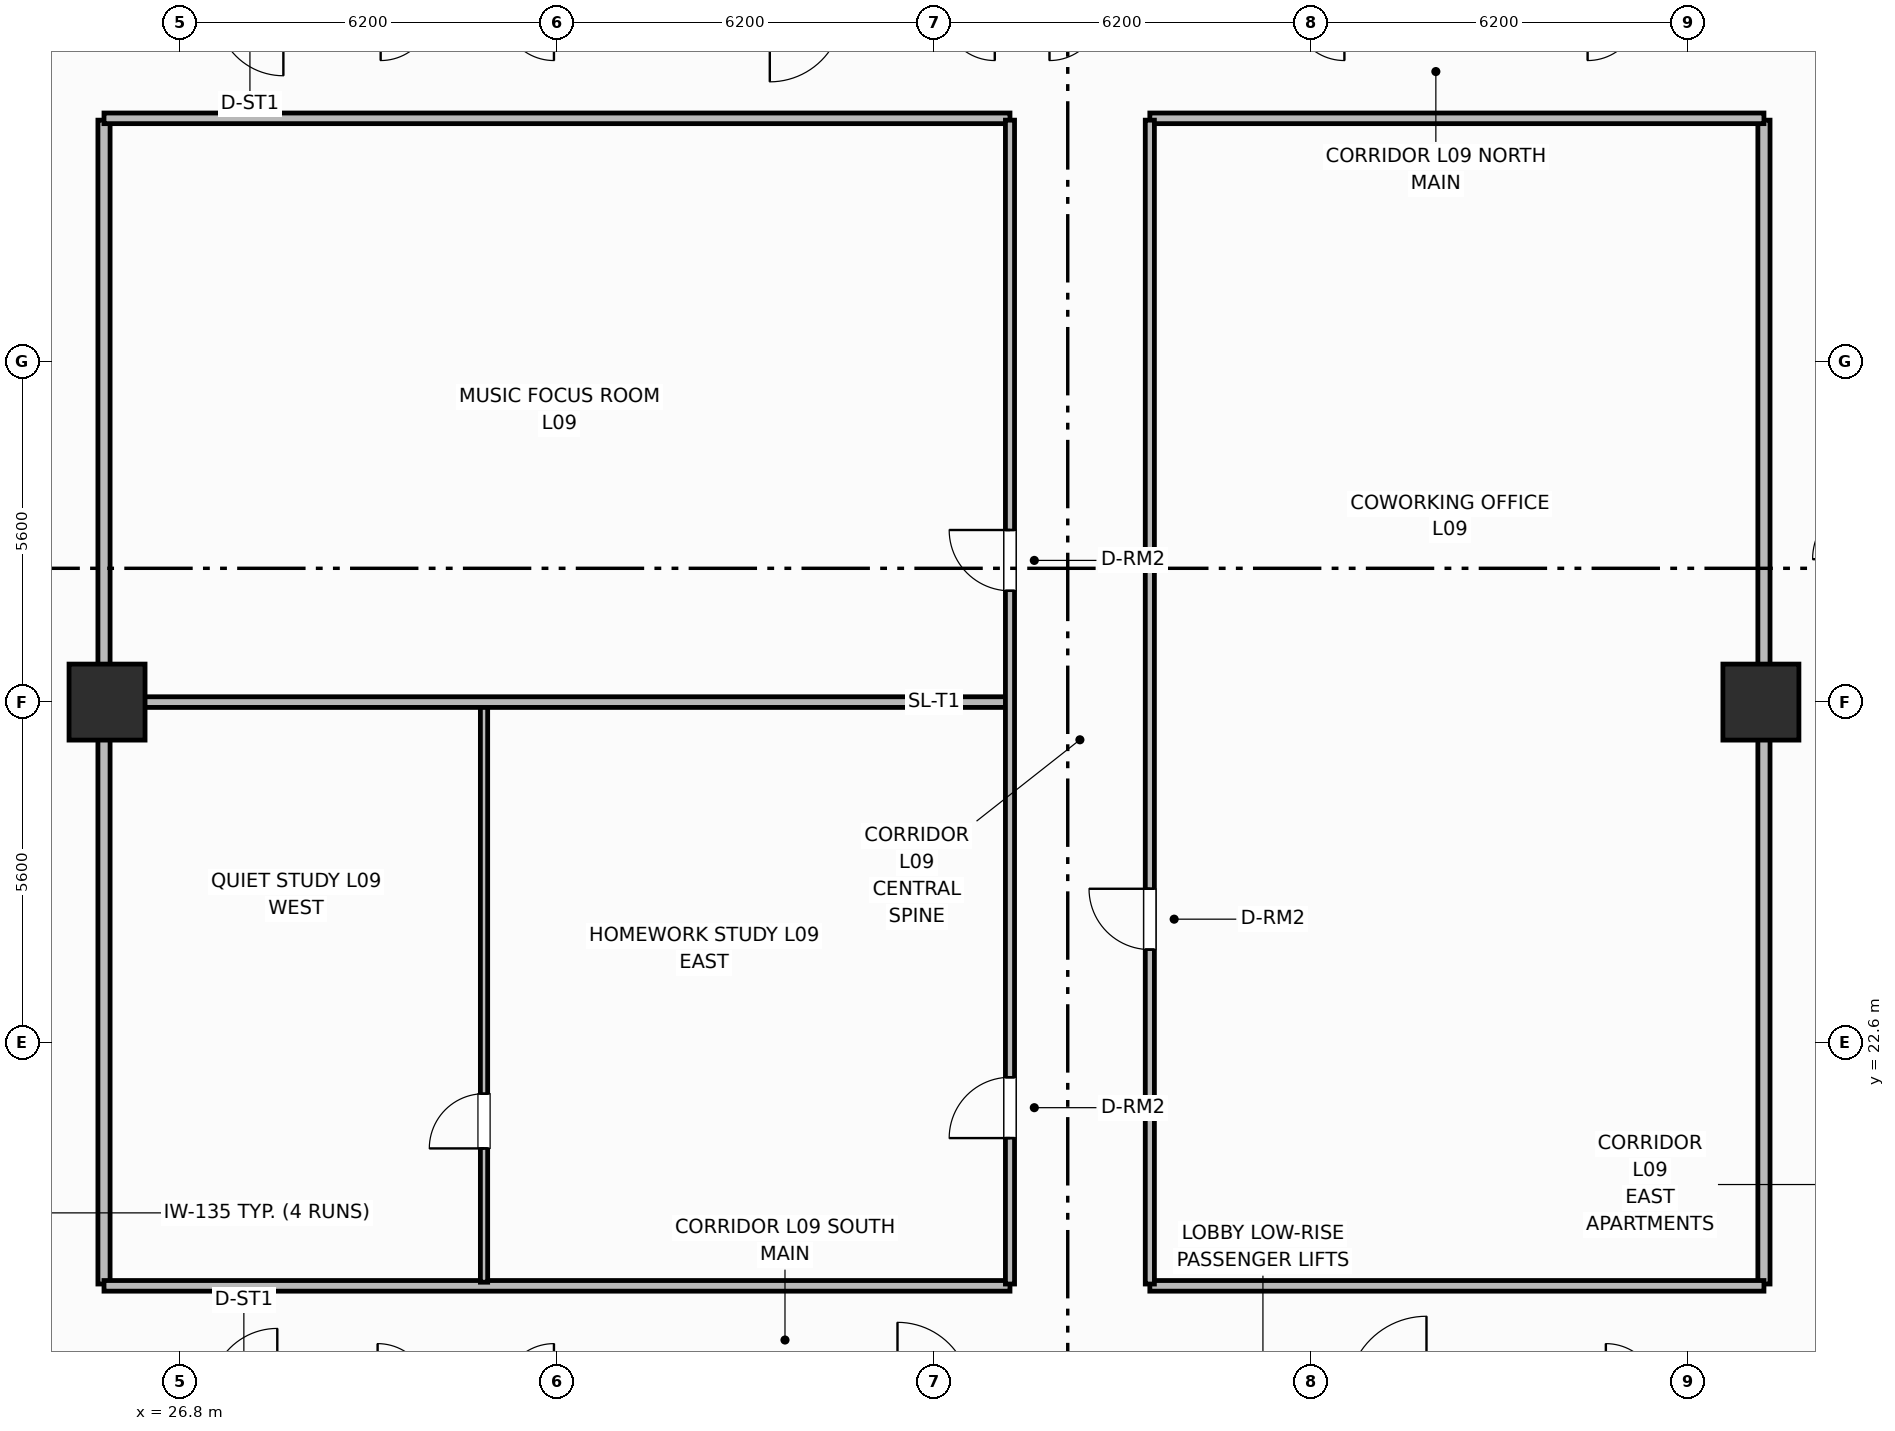
"""IFC4 building model, lengths in metres.
Left out: names, types, materials, properties, quantities, classifications, styles, units other than length and angle.
Written with IfcOpenShell. Run it as: python <this file> out.ifc"""

import sys

from ifc_helpers import new_model, si_unit, direction, frame, frame_2d, origin, origin_2d, place, context, subcontext, project, spatial, rectangle, extrude, element, fill, save


model = new_model("IFC4")
c1 = context("Model", 3, precision=1e-05, world=origin(), true_north=direction((0.0, 1.0)))
c2 = subcontext(c1, "Body", "Model", "MODEL_VIEW")
j1 = project(units=[si_unit("LENGTHUNIT", "METRE"), si_unit("PLANEANGLEUNIT", "RADIAN")], contexts=[c1])
p1 = place(None, origin())
s1 = spatial("IfcSite", under=j1, at=p1, CompositionType="ELEMENT")
p2 = place(p1, origin())
s2 = spatial("IfcBuilding", under=s1, at=p2, CompositionType="ELEMENT")
p3 = place(p2, frame((0.0, 0.0, 39.9)))
s3 = spatial("IfcBuildingStorey", under=s2, at=p3, CompositionType="ELEMENT", Elevation=39.9)
for number, where, z_axis, x_axis in (
    (1, (25.6, 28.2, 0.0), (0.0, 0.0, 1.0), (1.0, 0.0, 0.0)),
    (2, (52.8, 28.2, 0.0), (0.0, 0.0, 1.0), (1.0, 0.0, 0.0)),
):
    element("IfcColumn", number, at=place(p3, frame(where, z_axis=z_axis, x_axis=x_axis)), inside=s3, PredefinedType="COLUMN", context=c2, shape_type="SweptSolid", body=[
        extrude(rectangle(XDim=1.25, YDim=1.25, at=origin_2d()), origin(), (0.0, 0.0, 1.0), 3.7),
    ])
for number, where, z_axis, x_axis in (
    (3, (25.55, 18.63, 0.0), (0.0, 0.0, 1.0), (0.0, 1.0, 0.0)),
    (4, (52.85, 18.63, 0.0), (0.0, 0.0, 1.0), (0.0, 1.0, 0.0)),
):
    element("IfcWall", number, at=place(p3, frame(where, z_axis=z_axis, x_axis=x_axis)), inside=s3, PredefinedType="PARTITIONING", context=c2, shape_type="SweptSolid", body=[
        extrude(rectangle(XDim=19.14, YDim=0.2, at=frame_2d((9.57, 0.0))), origin(), (0.0, 0.0, 1.0), 2.53),
    ])
p4 = place(p3, frame((25.55, 18.6, 0.0), z_axis=(0.0, 0.0, 1.0), x_axis=(1.0, 0.0, 0.0)))
e5 = element("IfcWall", 5, at=p4, inside=s3, PredefinedType="PARTITIONING", context=c2, shape_type="SweptSolid", body=[
    extrude(rectangle(XDim=14.9, YDim=0.175, at=frame_2d((7.45, 0.0))), origin(), (0.0, 0.0, 1.0), 2.53),
])
p5 = place(p3, frame((42.75, 18.6, 0.0), z_axis=(0.0, 0.0, 1.0), x_axis=(1.0, 0.0, 0.0)))
e6 = element("IfcWall", 6, at=p5, inside=s3, PredefinedType="PARTITIONING", context=c2, shape_type="SweptSolid", body=[
    extrude(rectangle(XDim=10.1, YDim=0.175, at=frame_2d((5.05, 0.0))), origin(), (0.0, 0.0, 1.0), 2.53),
])
p6 = place(p3, frame((25.55, 37.8, 0.0), z_axis=(0.0, 0.0, 1.0), x_axis=(1.0, 0.0, 0.0)))
e7 = element("IfcWall", 7, at=p6, inside=s3, PredefinedType="PARTITIONING", context=c2, shape_type="SweptSolid", body=[
    extrude(rectangle(XDim=14.9, YDim=0.175, at=frame_2d((7.45, 0.0))), origin(), (0.0, 0.0, 1.0), 2.53),
])
p7 = place(p3, frame((42.75, 37.8, 0.0), z_axis=(0.0, 0.0, 1.0), x_axis=(1.0, 0.0, 0.0)))
e8 = element("IfcWall", 8, at=p7, inside=s3, PredefinedType="PARTITIONING", context=c2, shape_type="SweptSolid", body=[
    extrude(rectangle(XDim=10.1, YDim=0.175, at=frame_2d((5.05, 0.0))), origin(), (0.0, 0.0, 1.0), 2.53),
])
p8 = place(p3, frame((31.8, 18.66, 0.0), z_axis=(0.0, 0.0, 1.0), x_axis=(0.0, 1.0, 0.0)))
e9 = element("IfcWall", 9, at=p8, inside=s3, PredefinedType="PARTITIONING", context=c2, shape_type="SweptSolid", body=[
    extrude(rectangle(XDim=9.49, YDim=0.12, at=frame_2d((4.745, 0.0))), origin(), (0.0, 0.0, 1.0), 2.53),
])
p9 = place(p8, frame((2.2, 0.0, 0.0)))
e10 = element("IfcOpeningElement", 10, at=p9, cuts=e9, PredefinedType="OPENING", context=c2, shape_type="SweptSolid", body=[
    extrude(rectangle(XDim=0.9, YDim=2.1, at=frame_2d((0.45, 1.05))), frame((0.0, 0.07, 0.0), z_axis=(0.0, -1.0, 0.0), x_axis=(1.0, 0.0, 0.0)), (0.0, 0.0, 1.0), 0.14),
])
p10 = place(p3, frame((25.6, 28.2, 0.0), z_axis=(0.0, 0.0, 1.0), x_axis=(1.0, 0.0, 0.0)))
e11 = element("IfcWall", 11, at=p10, inside=s3, PredefinedType="PARTITIONING", context=c2, shape_type="SweptSolid", body=[
    extrude(rectangle(XDim=14.87, YDim=0.175, at=frame_2d((7.435, 0.0))), origin(), (0.0, 0.0, 1.0), 2.53),
])
p11 = place(p3, frame((40.45, 18.63, 0.0), z_axis=(0.0, 0.0, 1.0), x_axis=(0.0, 1.0, 0.0)))
e12 = element("IfcWall", 12, at=p11, inside=s3, PredefinedType="PARTITIONING", context=c2, shape_type="SweptSolid", body=[
    extrude(rectangle(XDim=19.14, YDim=0.15, at=frame_2d((9.57, 0.0))), origin(), (0.0, 0.0, 1.0), 2.53),
])
p12 = place(p11, frame((2.4, 0.0, 0.0)))
e13 = element("IfcOpeningElement", 13, at=p12, cuts=e12, PredefinedType="OPENING", context=c2, shape_type="SweptSolid", body=[
    extrude(rectangle(XDim=1.0, YDim=2.15, at=frame_2d((0.5, 1.075))), frame((0.0, 0.085, 0.0), z_axis=(0.0, -1.0, 0.0), x_axis=(1.0, 0.0, 0.0)), (0.0, 0.0, 1.0), 0.17),
])
p13 = place(p11, frame((11.4, 0.0, 0.0)))
e14 = element("IfcOpeningElement", 14, at=p13, cuts=e12, PredefinedType="OPENING", context=c2, shape_type="SweptSolid", body=[
    extrude(rectangle(XDim=1.0, YDim=2.15, at=frame_2d((0.5, 1.075))), frame((0.0, 0.085, 0.0), z_axis=(0.0, -1.0, 0.0), x_axis=(1.0, 0.0, 0.0)), (0.0, 0.0, 1.0), 0.17),
])
p14 = place(p3, frame((42.75, 18.63, 0.0), z_axis=(0.0, 0.0, 1.0), x_axis=(0.0, 1.0, 0.0)))
e15 = element("IfcWall", 15, at=p14, inside=s3, PredefinedType="PARTITIONING", context=c2, shape_type="SweptSolid", body=[
    extrude(rectangle(XDim=19.14, YDim=0.15, at=frame_2d((9.57, 0.0))), origin(), (0.0, 0.0, 1.0), 2.53),
])
p15 = place(p14, frame((5.5, 0.0, 0.0)))
e16 = element("IfcOpeningElement", 16, at=p15, cuts=e15, PredefinedType="OPENING", context=c2, shape_type="SweptSolid", body=[
    extrude(rectangle(XDim=1.0, YDim=2.15, at=frame_2d((0.5, 1.075))), frame((0.0, 0.085, 0.0), z_axis=(0.0, -1.0, 0.0), x_axis=(1.0, 0.0, 0.0)), (0.0, 0.0, 1.0), 0.17),
])
p16 = place(p9, origin())
e17 = element("IfcDoor", 17, at=p16, inside=s3, OperationType="SINGLE_SWING_LEFT", PredefinedType="DOOR", context=c2, shape_type="SweptSolid", body=[
    extrude(rectangle(XDim=0.9, YDim=2.1, at=frame_2d((0.45, 1.05))), frame((0.0, 0.025, 0.0), z_axis=(0.0, -1.0, 0.0), x_axis=(1.0, 0.0, 0.0)), (0.0, 0.0, 1.0), 0.05),
])
fill(e10, e17)
p17 = place(p12, origin())
e18 = element("IfcDoor", 18, at=p17, inside=s3, OperationType="SINGLE_SWING_LEFT", PredefinedType="DOOR", context=c2, shape_type="SweptSolid", body=[
    extrude(rectangle(XDim=1.0, YDim=2.15, at=frame_2d((0.5, 1.075))), frame((0.0, 0.025, 0.0), z_axis=(0.0, -1.0, 0.0), x_axis=(1.0, 0.0, 0.0)), (0.0, 0.0, 1.0), 0.05),
])
fill(e13, e18)
p18 = place(p13, origin())
e19 = element("IfcDoor", 19, at=p18, inside=s3, OperationType="SINGLE_SWING_RIGHT", PredefinedType="DOOR", context=c2, shape_type="SweptSolid", body=[
    extrude(rectangle(XDim=1.0, YDim=2.15, at=frame_2d((0.5, 1.075))), frame((0.0, 0.025, 0.0), z_axis=(0.0, -1.0, 0.0), x_axis=(1.0, 0.0, 0.0)), (0.0, 0.0, 1.0), 0.05),
])
fill(e14, e19)
p19 = place(p15, origin())
e20 = element("IfcDoor", 20, at=p19, inside=s3, OperationType="SINGLE_SWING_RIGHT", PredefinedType="DOOR", context=c2, shape_type="SweptSolid", body=[
    extrude(rectangle(XDim=1.0, YDim=2.15, at=frame_2d((0.5, 1.075))), frame((0.0, 0.025, 0.0), z_axis=(0.0, -1.0, 0.0), x_axis=(1.0, 0.0, 0.0)), (0.0, 0.0, 1.0), 0.05),
])
fill(e16, e20)
save(model, sys.argv[1])
